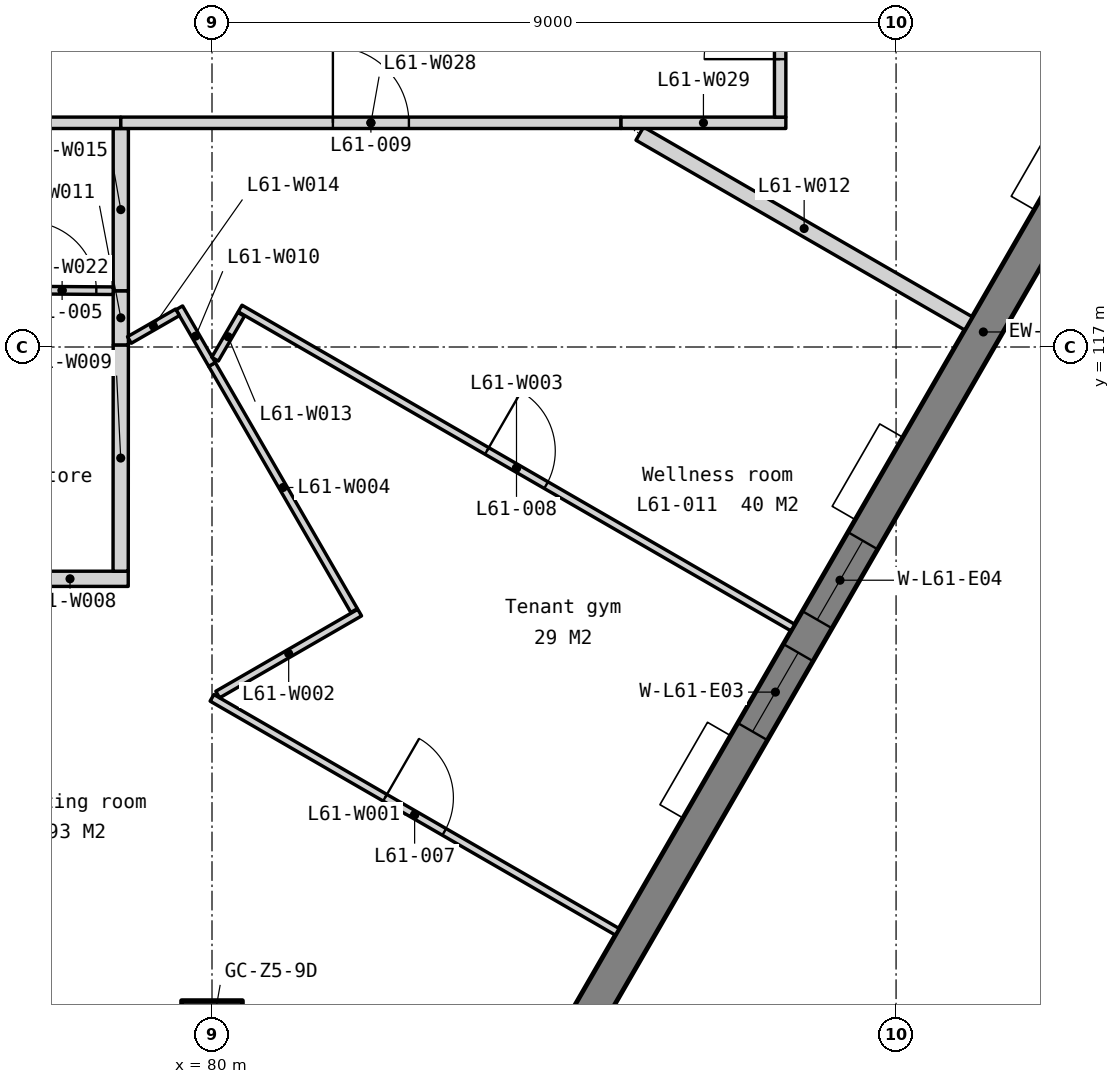
"""IFC4 building model, lengths in metres.
Left out: names, types, materials, properties, quantities, classifications, styles, units other than length and angle.
Written with IfcOpenShell. Run it as: python <this file> out.ifc"""

import sys

from ifc_helpers import new_model, si_unit, direction, frame, frame_2d, origin, origin_2d, place, context, subcontext, project, spatial, polyline, rectangle, outline, extrude, element, fill, save


model = new_model("IFC4")
c1 = context("Model", 3, precision=1e-05, world=origin(), true_north=direction((0.0, 1.0)))
c2 = subcontext(c1, "Body", "Model", "MODEL_VIEW")
j1 = project(units=[si_unit("LENGTHUNIT", "METRE"), si_unit("PLANEANGLEUNIT", "RADIAN")], contexts=[c1])
p1 = place(None, origin())
s1 = spatial("IfcSite", under=j1, at=p1, CompositionType="ELEMENT")
p2 = place(p1, origin())
s2 = spatial("IfcBuilding", under=s1, at=p2, CompositionType="ELEMENT")
p3 = place(p2, frame((0.0, 0.0, 250.4)))
s3 = spatial("IfcBuildingStorey", under=s2, at=p3, CompositionType="ELEMENT", Elevation=250.4)
p4 = place(p3, frame((80.0, 108.0, 0.0), z_axis=(0.0, 0.0, 1.0), x_axis=(1.0, 0.0, 0.0)))
e1 = element("IfcColumn", 1, at=p4, inside=s3, PredefinedType="COLUMN", context=c2, shape_type="SweptSolid", body=[
    extrude(rectangle(XDim=0.8, YDim=0.8, at=origin_2d()), origin(), (0.0, 0.0, 1.0), 3.9),
])
p5 = place(p3, frame((60.609, 133.207, -0.15), z_axis=(0.0, 0.0, 1.0), x_axis=(0.500002536638, -0.866023939251, 0.0)))
e2 = element("IfcWall", 2, at=p5, inside=s3, PredefinedType="SOLIDWALL", context=c2, shape_type="SweptSolid", body=[
    extrude(outline(polyline([(36.972, 0.0), (36.972, 3.9), (0.0, 3.9), (0.0, 0.0), (36.972, 0.0)])), frame((0.0, 0.225, 0.0), z_axis=(0.0, -1.0, 0.0), x_axis=(1.0, 0.0, 0.0)), (0.0, 0.0, 1.0), 0.45),
])
p6 = place(p5, frame((3.172, 0.0, 0.95)))
e3 = element("IfcOpeningElement", 3, at=p6, cuts=e2, PredefinedType="OPENING", context=c2, shape_type="SweptSolid", body=[
    extrude(rectangle(XDim=1.2, YDim=2.2, at=frame_2d((0.6, 1.1))), frame((0.0, 0.235, 0.0), z_axis=(0.0, -1.0, 0.0), x_axis=(1.0, 0.0, 0.0)), (0.0, 0.0, 1.0), 0.47),
])
p7 = place(p5, frame((4.872, 0.0, 0.95)))
e4 = element("IfcOpeningElement", 4, at=p7, cuts=e2, PredefinedType="OPENING", context=c2, shape_type="SweptSolid", body=[
    extrude(rectangle(XDim=1.2, YDim=2.2, at=frame_2d((0.6, 1.1))), frame((0.0, 0.235, 0.0), z_axis=(0.0, -1.0, 0.0), x_axis=(1.0, 0.0, 0.0)), (0.0, 0.0, 1.0), 0.47),
])
p8 = place(p5, frame((12.415, 0.0, 0.95)))
e5 = element("IfcOpeningElement", 5, at=p8, cuts=e2, PredefinedType="OPENING", context=c2, shape_type="SweptSolid", body=[
    extrude(rectangle(XDim=1.2, YDim=2.2, at=frame_2d((0.6, 1.1))), frame((0.0, 0.235, 0.0), z_axis=(0.0, -1.0, 0.0), x_axis=(1.0, 0.0, 0.0)), (0.0, 0.0, 1.0), 0.47),
])
p9 = place(p5, frame((14.115, 0.0, 0.95)))
e6 = element("IfcOpeningElement", 6, at=p9, cuts=e2, PredefinedType="OPENING", context=c2, shape_type="SweptSolid", body=[
    extrude(rectangle(XDim=1.2, YDim=2.2, at=frame_2d((0.6, 1.1))), frame((0.0, 0.235, 0.0), z_axis=(0.0, -1.0, 0.0), x_axis=(1.0, 0.0, 0.0)), (0.0, 0.0, 1.0), 0.47),
])
p10 = place(p5, frame((21.658, 0.0, 0.95)))
e7 = element("IfcOpeningElement", 7, at=p10, cuts=e2, PredefinedType="OPENING", context=c2, shape_type="SweptSolid", body=[
    extrude(rectangle(XDim=1.2, YDim=2.2, at=frame_2d((0.6, 1.1))), frame((0.0, 0.235, 0.0), z_axis=(0.0, -1.0, 0.0), x_axis=(1.0, 0.0, 0.0)), (0.0, 0.0, 1.0), 0.47),
])
p11 = place(p5, frame((23.358, 0.0, 0.95)))
e8 = element("IfcOpeningElement", 8, at=p11, cuts=e2, PredefinedType="OPENING", context=c2, shape_type="SweptSolid", body=[
    extrude(rectangle(XDim=1.2, YDim=2.2, at=frame_2d((0.6, 1.1))), frame((0.0, 0.235, 0.0), z_axis=(0.0, -1.0, 0.0), x_axis=(1.0, 0.0, 0.0)), (0.0, 0.0, 1.0), 0.47),
])
p12 = place(p5, frame((30.901, 0.0, 0.95)))
e9 = element("IfcOpeningElement", 9, at=p12, cuts=e2, PredefinedType="OPENING", context=c2, shape_type="SweptSolid", body=[
    extrude(rectangle(XDim=1.2, YDim=2.2, at=frame_2d((0.6, 1.1))), frame((0.0, 0.235, 0.0), z_axis=(0.0, -1.0, 0.0), x_axis=(1.0, 0.0, 0.0)), (0.0, 0.0, 1.0), 0.47),
])
p13 = place(p5, frame((32.601, 0.0, 0.95)))
e10 = element("IfcOpeningElement", 10, at=p13, cuts=e2, PredefinedType="OPENING", context=c2, shape_type="SweptSolid", body=[
    extrude(rectangle(XDim=1.2, YDim=2.2, at=frame_2d((0.6, 1.1))), frame((0.0, 0.235, 0.0), z_axis=(0.0, -1.0, 0.0), x_axis=(1.0, 0.0, 0.0)), (0.0, 0.0, 1.0), 0.47),
])
p14 = place(p3, frame((80.905, 101.188, -0.15), z_axis=(0.0, 0.0, 1.0), x_axis=(0.500002536638, 0.866023939251, 0.0)))
e11 = element("IfcWall", 11, at=p14, inside=s3, PredefinedType="SOLIDWALL", context=c2, shape_type="SweptSolid", body=[
    extrude(outline(polyline([(36.972, 0.0), (36.972, 3.9), (0.0, 3.9), (0.0, 0.0), (36.972, 0.0)])), frame((0.0, 0.225, 0.0), z_axis=(0.0, -1.0, 0.0), x_axis=(1.0, 0.0, 0.0)), (0.0, 0.0, 1.0), 0.45),
])
p15 = place(p14, frame((3.172, 0.0, 0.95)))
e12 = element("IfcOpeningElement", 12, at=p15, cuts=e11, PredefinedType="OPENING", context=c2, shape_type="SweptSolid", body=[
    extrude(rectangle(XDim=1.2, YDim=2.2, at=frame_2d((0.6, 1.1))), frame((0.0, 0.235, 0.0), z_axis=(0.0, -1.0, 0.0), x_axis=(1.0, 0.0, 0.0)), (0.0, 0.0, 1.0), 0.47),
])
p16 = place(p14, frame((4.872, 0.0, 0.95)))
e13 = element("IfcOpeningElement", 13, at=p16, cuts=e11, PredefinedType="OPENING", context=c2, shape_type="SweptSolid", body=[
    extrude(rectangle(XDim=1.2, YDim=2.2, at=frame_2d((0.6, 1.1))), frame((0.0, 0.235, 0.0), z_axis=(0.0, -1.0, 0.0), x_axis=(1.0, 0.0, 0.0)), (0.0, 0.0, 1.0), 0.47),
])
p17 = place(p14, frame((12.415, 0.0, 0.95)))
e14 = element("IfcOpeningElement", 14, at=p17, cuts=e11, PredefinedType="OPENING", context=c2, shape_type="SweptSolid", body=[
    extrude(rectangle(XDim=1.2, YDim=2.2, at=frame_2d((0.6, 1.1))), frame((0.0, 0.235, 0.0), z_axis=(0.0, -1.0, 0.0), x_axis=(1.0, 0.0, 0.0)), (0.0, 0.0, 1.0), 0.47),
])
p18 = place(p14, frame((14.115, 0.0, 0.95)))
e15 = element("IfcOpeningElement", 15, at=p18, cuts=e11, PredefinedType="OPENING", context=c2, shape_type="SweptSolid", body=[
    extrude(rectangle(XDim=1.2, YDim=2.2, at=frame_2d((0.6, 1.1))), frame((0.0, 0.235, 0.0), z_axis=(0.0, -1.0, 0.0), x_axis=(1.0, 0.0, 0.0)), (0.0, 0.0, 1.0), 0.47),
])
p19 = place(p14, frame((21.658, 0.0, 0.95)))
e16 = element("IfcOpeningElement", 16, at=p19, cuts=e11, PredefinedType="OPENING", context=c2, shape_type="SweptSolid", body=[
    extrude(rectangle(XDim=1.2, YDim=2.2, at=frame_2d((0.6, 1.1))), frame((0.0, 0.235, 0.0), z_axis=(0.0, -1.0, 0.0), x_axis=(1.0, 0.0, 0.0)), (0.0, 0.0, 1.0), 0.47),
])
p20 = place(p14, frame((23.358, 0.0, 0.95)))
e17 = element("IfcOpeningElement", 17, at=p20, cuts=e11, PredefinedType="OPENING", context=c2, shape_type="SweptSolid", body=[
    extrude(rectangle(XDim=1.2, YDim=2.2, at=frame_2d((0.6, 1.1))), frame((0.0, 0.235, 0.0), z_axis=(0.0, -1.0, 0.0), x_axis=(1.0, 0.0, 0.0)), (0.0, 0.0, 1.0), 0.47),
])
p21 = place(p14, frame((30.901, 0.0, 0.95)))
e18 = element("IfcOpeningElement", 18, at=p21, cuts=e11, PredefinedType="OPENING", context=c2, shape_type="SweptSolid", body=[
    extrude(rectangle(XDim=1.2, YDim=2.2, at=frame_2d((0.6, 1.1))), frame((0.0, 0.235, 0.0), z_axis=(0.0, -1.0, 0.0), x_axis=(1.0, 0.0, 0.0)), (0.0, 0.0, 1.0), 0.47),
])
p22 = place(p14, frame((32.601, 0.0, 0.95)))
e19 = element("IfcOpeningElement", 19, at=p22, cuts=e11, PredefinedType="OPENING", context=c2, shape_type="SweptSolid", body=[
    extrude(rectangle(XDim=1.2, YDim=2.2, at=frame_2d((0.6, 1.1))), frame((0.0, 0.235, 0.0), z_axis=(0.0, -1.0, 0.0), x_axis=(1.0, 0.0, 0.0)), (0.0, 0.0, 1.0), 0.47),
])
p23 = place(p3, frame((80.0, 112.384, 0.0), z_axis=(0.0, 0.0, 1.0), x_axis=(0.866021154418, -0.500007360046, 0.0)))
e20 = element("IfcWall", 20, at=p23, inside=s3, PredefinedType="PARTITIONING", context=c2, shape_type="SweptSolid", body=[
    extrude(rectangle(XDim=6.157, YDim=0.1, at=frame_2d((3.078, 0.0))), origin(), (0.0, 0.0, 1.0), 3.75),
])
p24 = place(p23, frame((2.628, 0.0, 0.0)))
e21 = element("IfcOpeningElement", 21, at=p24, cuts=e20, PredefinedType="OPENING", context=c2, shape_type="SweptSolid", body=[
    extrude(rectangle(XDim=0.9, YDim=2.1, at=frame_2d((0.45, 1.05))), frame((0.0, 0.06, 0.0), z_axis=(0.0, -1.0, 0.0), x_axis=(1.0, 0.0, 0.0)), (0.0, 0.0, 1.0), 0.12),
])
p25 = place(p3, frame((80.075, 112.427, 0.0), z_axis=(0.0, 0.0, 1.0), x_axis=(0.866040446274, 0.499973944738, 0.0)))
e22 = element("IfcWall", 22, at=p25, inside=s3, PredefinedType="PARTITIONING", context=c2, shape_type="SweptSolid", body=[
    extrude(rectangle(XDim=2.157, YDim=0.1, at=frame_2d((1.078, 0.0))), origin(), (0.0, 0.0, 1.0), 3.75),
])
p26 = place(p3, frame((80.37, 117.507, 0.0), z_axis=(0.0, 0.0, 1.0), x_axis=(0.866028733576, -0.499994232587, 0.0)))
e23 = element("IfcWall", 23, at=p26, inside=s3, PredefinedType="PARTITIONING", context=c2, shape_type="SweptSolid", body=[
    extrude(rectangle(XDim=8.398, YDim=0.1, at=frame_2d((4.199, 0.0))), origin(), (0.0, 0.0, 1.0), 3.75),
])
p27 = place(p26, frame((3.749, 0.0, 0.0)))
e24 = element("IfcOpeningElement", 24, at=p27, cuts=e23, PredefinedType="OPENING", context=c2, shape_type="SweptSolid", body=[
    extrude(rectangle(XDim=0.9, YDim=2.1, at=frame_2d((0.45, 1.05))), frame((0.0, 0.06, 0.0), z_axis=(0.0, -1.0, 0.0), x_axis=(1.0, 0.0, 0.0)), (0.0, 0.0, 1.0), 0.12),
])
p28 = place(p3, frame((80.0, 116.771, 0.0), z_axis=(0.0, 0.0, 1.0), x_axis=(0.499980576233, -0.866036617811, 0.0)))
e25 = element("IfcWall", 25, at=p28, inside=s3, PredefinedType="PARTITIONING", context=c2, shape_type="SweptSolid", body=[
    extrude(rectangle(XDim=3.739, YDim=0.1, at=frame_2d((1.87, 0.0))), origin(), (0.0, 0.0, 1.0), 3.75),
])
p29 = place(p3, frame((77.366, 113.95, 0.0), z_axis=(0.0, 0.0, 1.0), x_axis=(1.0, 0.0, 0.0)))
e26 = element("IfcWall", 26, at=p29, inside=s3, PredefinedType="PARTITIONING", context=c2, shape_type="SweptSolid", body=[
    extrude(rectangle(XDim=1.532, YDim=0.2, at=frame_2d((0.766, 0.0))), origin(), (0.0, 0.0, 1.0), 3.75),
])
p30 = place(p3, frame((78.798, 114.05, 0.0), z_axis=(0.0, 0.0, 1.0), x_axis=(0.000656006419, 0.999999784828, 0.0)))
e27 = element("IfcWall", 27, at=p30, inside=s3, PredefinedType="PARTITIONING", context=c2, shape_type="SweptSolid", body=[
    extrude(rectangle(XDim=2.977, YDim=0.2, at=frame_2d((1.489, 0.0))), origin(), (0.0, 0.0, 1.0), 3.75),
])
p31 = place(p3, frame((79.57, 117.516, 0.0), z_axis=(0.0, 0.0, 1.0), x_axis=(0.499861615673, -0.866105285272, 0.0)))
e28 = element("IfcWall", 28, at=p31, inside=s3, PredefinedType="PARTITIONING", context=c2, shape_type="SweptSolid", body=[
    extrude(rectangle(XDim=0.861, YDim=0.1, at=frame_2d((0.43, 0.0))), origin(), (0.0, 0.0, 1.0), 3.75),
])
p32 = place(p3, frame((78.8, 117.027, 0.0), z_axis=(0.0, 0.0, 1.0), x_axis=(0.0, 1.0, 0.0)))
e29 = element("IfcWall", 29, at=p32, inside=s3, PredefinedType="PARTITIONING", context=c2, shape_type="SweptSolid", body=[
    extrude(rectangle(XDim=0.713, YDim=0.2, at=frame_2d((0.356, 0.0))), origin(), (0.0, 0.0, 1.0), 3.75),
])
p33 = place(p3, frame((85.628, 119.807, 0.0), z_axis=(0.0, 0.0, 1.0), x_axis=(0.866032544947, -0.499987630939, 0.0)))
e30 = element("IfcWall", 30, at=p33, inside=s3, PredefinedType="PARTITIONING", context=c2, shape_type="SweptSolid", body=[
    extrude(rectangle(XDim=4.994, YDim=0.2, at=frame_2d((2.497, 0.0))), origin(), (0.0, 0.0, 1.0), 3.75),
])
p34 = place(p3, frame((80.04, 116.84, 0.0), z_axis=(0.0, 0.0, 1.0), x_axis=(0.501867975937, 0.86494423793, 0.0)))
e31 = element("IfcWall", 31, at=p34, inside=s3, PredefinedType="PARTITIONING", context=c2, shape_type="SweptSolid", body=[
    extrude(rectangle(XDim=0.683, YDim=0.1, at=frame_2d((0.341, 0.0))), origin(), (0.0, 0.0, 1.0), 3.75),
])
p35 = place(p3, frame((78.913, 117.092, 0.0), z_axis=(0.0, 0.0, 1.0), x_axis=(0.867068692485, 0.498188601347, 0.0)))
e32 = element("IfcWall", 32, at=p35, inside=s3, PredefinedType="PARTITIONING", context=c2, shape_type="SweptSolid", body=[
    extrude(rectangle(XDim=0.731, YDim=0.1, at=frame_2d((0.365, 0.0))), origin(), (0.0, 0.0, 1.0), 3.75),
])
p36 = place(p3, frame((78.8, 117.74, 0.0), z_axis=(0.0, 0.0, 1.0), x_axis=(0.0, 1.0, 0.0)))
e33 = element("IfcWall", 33, at=p36, inside=s3, PredefinedType="PARTITIONING", context=c2, shape_type="SweptSolid", body=[
    extrude(rectangle(XDim=2.135, YDim=0.2, at=frame_2d((1.067, 0.0))), origin(), (0.0, 0.0, 1.0), 3.75),
])
p37 = place(p3, frame((77.356, 117.75, 0.0), z_axis=(0.0, 0.0, 1.0), x_axis=(0.99997617642, -0.006902651172, 0.0)))
e34 = element("IfcWall", 34, at=p37, inside=s3, PredefinedType="PARTITIONING", context=c2, shape_type="SweptSolid", body=[
    extrude(rectangle(XDim=1.344, YDim=0.1, at=frame_2d((0.672, 0.0))), origin(), (0.0, 0.0, 1.0), 3.75),
])
p38 = place(p37, frame((0.222, 0.0, 0.0)))
e35 = element("IfcOpeningElement", 35, at=p38, cuts=e34, PredefinedType="OPENING", context=c2, shape_type="SweptSolid", body=[
    extrude(rectangle(XDim=0.9, YDim=2.1, at=frame_2d((0.45, 1.05))), frame((0.0, 0.06, 0.0), z_axis=(0.0, -1.0, 0.0), x_axis=(1.0, 0.0, 0.0)), (0.0, 0.0, 1.0), 0.12),
])
p39 = place(p3, frame((72.525, 119.95, 0.0), z_axis=(0.0, 0.0, 1.0), x_axis=(1.0, 0.0, 0.0)))
e36 = element("IfcWall", 36, at=p39, inside=s3, PredefinedType="PARTITIONING", context=c2, shape_type="SweptSolid", body=[
    extrude(rectangle(XDim=6.275, YDim=0.15, at=frame_2d((3.138, 0.0))), origin(), (0.0, 0.0, 1.0), 3.75),
])
p40 = place(p39, frame((2.637, 0.0, 0.0)))
e37 = element("IfcOpeningElement", 37, at=p40, cuts=e36, PredefinedType="OPENING", context=c2, shape_type="SweptSolid", body=[
    extrude(rectangle(XDim=1.0, YDim=2.1, at=frame_2d((0.5, 1.05))), frame((0.0, 0.085, 0.0), z_axis=(0.0, -1.0, 0.0), x_axis=(1.0, 0.0, 0.0)), (0.0, 0.0, 1.0), 0.17),
])
p41 = place(p3, frame((78.8, 119.95, 0.0), z_axis=(0.0, 0.0, 1.0), x_axis=(1.0, 0.0, 0.0)))
e38 = element("IfcWall", 38, at=p41, inside=s3, PredefinedType="PARTITIONING", context=c2, shape_type="SweptSolid", body=[
    extrude(rectangle(XDim=6.581, YDim=0.15, at=frame_2d((3.291, 0.0))), origin(), (0.0, 0.0, 1.0), 3.75),
])
p42 = place(p41, frame((2.791, 0.0, 0.0)))
e39 = element("IfcOpeningElement", 39, at=p42, cuts=e38, PredefinedType="OPENING", context=c2, shape_type="SweptSolid", body=[
    extrude(rectangle(XDim=1.0, YDim=2.1, at=frame_2d((0.5, 1.05))), frame((0.0, 0.085, 0.0), z_axis=(0.0, -1.0, 0.0), x_axis=(1.0, 0.0, 0.0)), (0.0, 0.0, 1.0), 0.17),
])
p43 = place(p3, frame((85.381, 119.95, 0.0), z_axis=(0.0, 0.0, 1.0), x_axis=(1.0, 0.0, 0.0)))
e40 = element("IfcWall", 40, at=p43, inside=s3, PredefinedType="PARTITIONING", context=c2, shape_type="SweptSolid", body=[
    extrude(rectangle(XDim=2.169, YDim=0.15, at=frame_2d((1.084, 0.0))), origin(), (0.0, 0.0, 1.0), 3.75),
])
p44 = place(p3, frame((87.475, 120.025, 0.0), z_axis=(0.0, 0.0, 1.0), x_axis=(0.0, 1.0, 0.0)))
e41 = element("IfcWall", 41, at=p44, inside=s3, PredefinedType="PARTITIONING", context=c2, shape_type="SweptSolid", body=[
    extrude(rectangle(XDim=2.525, YDim=0.15, at=frame_2d((1.263, 0.0))), origin(), (0.0, 0.0, 1.0), 3.75),
])
p45 = place(p44, frame((0.762, 0.0, 0.0)))
e42 = element("IfcOpeningElement", 42, at=p45, cuts=e41, PredefinedType="OPENING", context=c2, shape_type="SweptSolid", body=[
    extrude(rectangle(XDim=1.0, YDim=2.1, at=frame_2d((0.5, 1.05))), frame((0.0, 0.085, 0.0), z_axis=(0.0, -1.0, 0.0), x_axis=(1.0, 0.0, 0.0)), (0.0, 0.0, 1.0), 0.17),
])
p46 = place(p17, origin())
e43 = element("IfcWindow", 43, at=p46, inside=s3, PartitioningType="SINGLE_PANEL", PredefinedType="WINDOW", context=c2, shape_type="SweptSolid", body=[
    extrude(rectangle(XDim=1.2, YDim=2.2, at=frame_2d((0.6, 1.1))), frame((0.0, 0.03, 0.0), z_axis=(0.0, -1.0, 0.0), x_axis=(1.0, 0.0, 0.0)), (0.0, 0.0, 1.0), 0.06),
])
fill(e14, e43)
p47 = place(p18, origin())
e44 = element("IfcWindow", 44, at=p47, inside=s3, PartitioningType="SINGLE_PANEL", PredefinedType="WINDOW", context=c2, shape_type="SweptSolid", body=[
    extrude(rectangle(XDim=1.2, YDim=2.2, at=frame_2d((0.6, 1.1))), frame((0.0, 0.03, 0.0), z_axis=(0.0, -1.0, 0.0), x_axis=(1.0, 0.0, 0.0)), (0.0, 0.0, 1.0), 0.06),
])
fill(e15, e44)
p48 = place(p38, origin())
e45 = element("IfcDoor", 45, at=p48, inside=s3, OperationType="SINGLE_SWING_LEFT", PredefinedType="DOOR", context=c2, shape_type="SweptSolid", body=[
    extrude(rectangle(XDim=0.9, YDim=2.1, at=frame_2d((0.45, 1.05))), frame((0.0, 0.025, 0.0), z_axis=(0.0, -1.0, 0.0), x_axis=(1.0, 0.0, 0.0)), (0.0, 0.0, 1.0), 0.05),
])
fill(e35, e45)
p49 = place(p24, origin())
e46 = element("IfcDoor", 46, at=p49, inside=s3, OperationType="SINGLE_SWING_LEFT", PredefinedType="DOOR", context=c2, shape_type="SweptSolid", body=[
    extrude(rectangle(XDim=0.9, YDim=2.1, at=frame_2d((0.45, 1.05))), frame((0.0, 0.025, 0.0), z_axis=(0.0, -1.0, 0.0), x_axis=(1.0, 0.0, 0.0)), (0.0, 0.0, 1.0), 0.05),
])
fill(e21, e46)
p50 = place(p27, origin())
e47 = element("IfcDoor", 47, at=p50, inside=s3, OperationType="SINGLE_SWING_LEFT", PredefinedType="DOOR", context=c2, shape_type="SweptSolid", body=[
    extrude(rectangle(XDim=0.9, YDim=2.1, at=frame_2d((0.45, 1.05))), frame((0.0, 0.025, 0.0), z_axis=(0.0, -1.0, 0.0), x_axis=(1.0, 0.0, 0.0)), (0.0, 0.0, 1.0), 0.05),
])
fill(e24, e47)
p51 = place(p42, origin())
e48 = element("IfcDoor", 48, at=p51, inside=s3, OperationType="SINGLE_SWING_LEFT", PredefinedType="DOOR", context=c2, shape_type="SweptSolid", body=[
    extrude(rectangle(XDim=1.0, YDim=2.1, at=frame_2d((0.5, 1.05))), frame((0.0, 0.025, 0.0), z_axis=(0.0, -1.0, 0.0), x_axis=(1.0, 0.0, 0.0)), (0.0, 0.0, 1.0), 0.05),
])
fill(e39, e48)
p52 = place(p45, origin())
e49 = element("IfcDoor", 49, at=p52, inside=s3, OperationType="SINGLE_SWING_LEFT", PredefinedType="DOOR", context=c2, shape_type="SweptSolid", body=[
    extrude(rectangle(XDim=1.0, YDim=2.1, at=frame_2d((0.5, 1.05))), frame((0.0, 0.025, 0.0), z_axis=(0.0, -1.0, 0.0), x_axis=(1.0, 0.0, 0.0)), (0.0, 0.0, 1.0), 0.05),
])
fill(e42, e49)
save(model, sys.argv[1])
